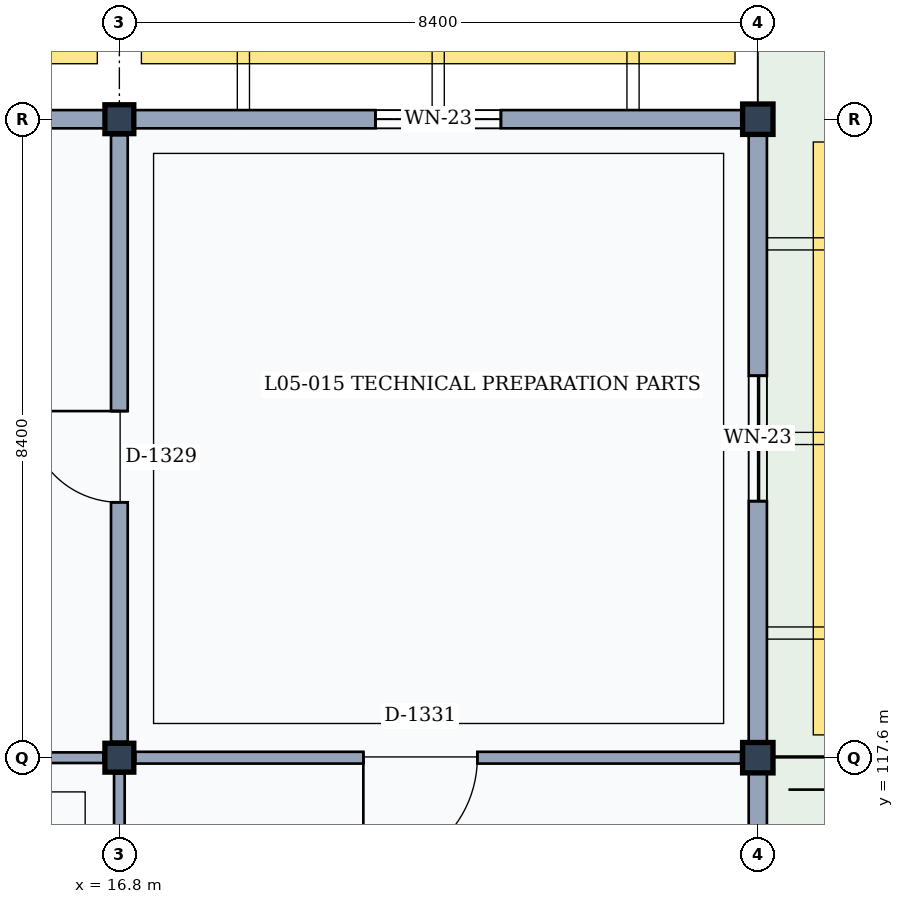
"""IFC4 building model, lengths in metres.
Left out: names, types, materials, properties, quantities, classifications, styles, units other than length and angle.
Written with IfcOpenShell. Run it as: python <this file> out.ifc"""

import sys

from ifc_helpers import new_model, si_unit, direction, frame, frame_2d, origin, origin_2d, place, context, subcontext, project, spatial, rectangle, extrude, element, fill, save


model = new_model("IFC4")
c1 = context("Model", 3, precision=1e-05, world=origin(), true_north=direction((0.0, 1.0)))
c2 = subcontext(c1, "Body", "Model", "MODEL_VIEW")
j1 = project(units=[si_unit("LENGTHUNIT", "METRE"), si_unit("PLANEANGLEUNIT", "RADIAN")], contexts=[c1])
p1 = place(None, origin())
s1 = spatial("IfcSite", under=j1, at=p1, CompositionType="ELEMENT")
p2 = place(p1, origin())
s2 = spatial("IfcBuilding", under=s1, at=p2, CompositionType="ELEMENT")
p3 = place(p2, frame((0.0, 0.0, 22.2)))
s3 = spatial("IfcBuildingStorey", under=s2, at=p3, CompositionType="ELEMENT", Elevation=22.2)
for number, where, z_axis, x_axis in (
    (1, (16.8, 117.6, 0.0), (0.0, 0.0, 1.0), (1.0, 0.0, 0.0)),
    (2, (16.8, 126.0, 0.0), (0.0, 0.0, 1.0), (1.0, 0.0, 0.0)),
):
    element("IfcColumn", number, at=place(p3, frame(where, z_axis=z_axis, x_axis=x_axis)), inside=s3, PredefinedType="COLUMN", context=c2, shape_type="SweptSolid", body=[
        extrude(rectangle(XDim=0.38, YDim=0.38, at=origin_2d()), origin(), (0.0, 0.0, 1.0), 4.2),
    ])
for number, where, z_axis, x_axis in (
    (3, (25.2, 117.6, 0.0), (0.0, 0.0, 1.0), (1.0, 0.0, 0.0)),
    (4, (25.2, 126.0, 0.0), (0.0, 0.0, 1.0), (1.0, 0.0, 0.0)),
):
    element("IfcColumn", number, at=place(p3, frame(where, z_axis=z_axis, x_axis=x_axis)), inside=s3, PredefinedType="COLUMN", context=c2, shape_type="SweptSolid", body=[
        extrude(rectangle(XDim=0.4, YDim=0.4, at=origin_2d()), origin(), (0.0, 0.0, 1.0), 4.2),
    ])
p4 = place(p3, frame((8.6, 126.0, 0.0), z_axis=(0.0, 0.0, 1.0), x_axis=(1.0, 0.0, 0.0)))
e5 = element("IfcWall", 5, at=p4, inside=s3, PredefinedType="SOLIDWALL", context=c2, shape_type="SweptSolid", body=[
    extrude(rectangle(XDim=8.01, YDim=0.24, at=frame_2d((4.005, 0.0))), origin(), (0.0, 0.0, 1.0), 3.36),
])
p5 = place(p4, frame((3.055, 0.0, 0.9)))
e6 = element("IfcOpeningElement", 6, at=p5, cuts=e5, PredefinedType="OPENING", context=c2, shape_type="SweptSolid", body=[
    extrude(rectangle(XDim=1.9, YDim=2.05, at=frame_2d((0.95, 1.025))), frame((0.0, 0.13, 0.0), z_axis=(0.0, -1.0, 0.0), x_axis=(1.0, 0.0, 0.0)), (0.0, 0.0, 1.0), 0.26),
])
p6 = place(p3, frame((25.2, 117.4, 0.0), z_axis=(0.0, 0.0, 1.0), x_axis=(0.0, -1.0, 0.0)))
e7 = element("IfcWall", 7, at=p6, inside=s3, PredefinedType="SOLIDWALL", context=c2, shape_type="SweptSolid", body=[
    extrude(rectangle(XDim=8.0, YDim=0.24, at=frame_2d((4.0, 0.0))), origin(), (0.0, 0.0, 1.0), 3.36),
])
p7 = place(p6, frame((3.45, 0.0, 0.0)))
e8 = element("IfcOpeningElement", 8, at=p7, cuts=e7, PredefinedType="OPENING", context=c2, shape_type="SweptSolid", body=[
    extrude(rectangle(XDim=1.1, YDim=2.2, at=frame_2d((0.55, 1.1))), frame((0.0, 0.13, 0.0), z_axis=(0.0, -1.0, 0.0), x_axis=(1.0, 0.0, 0.0)), (0.0, 0.0, 1.0), 0.26),
])
p8 = place(p3, frame((16.99, 126.0, 0.0), z_axis=(0.0, 0.0, 1.0), x_axis=(1.0, 0.0, 0.0)))
e9 = element("IfcWall", 9, at=p8, inside=s3, PredefinedType="SOLIDWALL", context=c2, shape_type="SweptSolid", body=[
    extrude(rectangle(XDim=8.01, YDim=0.24, at=frame_2d((4.005, 0.0))), origin(), (0.0, 0.0, 1.0), 3.36),
])
p9 = place(p8, frame((3.18, 0.0, 0.9)))
e10 = element("IfcOpeningElement", 10, at=p9, cuts=e9, PredefinedType="OPENING", context=c2, shape_type="SweptSolid", body=[
    extrude(rectangle(XDim=1.65, YDim=1.9, at=frame_2d((0.825, 0.95))), frame((0.0, 0.13, 0.0), z_axis=(0.0, -1.0, 0.0), x_axis=(1.0, 0.0, 0.0)), (0.0, 0.0, 1.0), 0.26),
])
p10 = place(p3, frame((25.2, 125.8, 0.0), z_axis=(0.0, 0.0, 1.0), x_axis=(0.0, -1.0, 0.0)))
e11 = element("IfcWall", 11, at=p10, inside=s3, PredefinedType="SOLIDWALL", context=c2, shape_type="SweptSolid", body=[
    extrude(rectangle(XDim=8.0, YDim=0.24, at=frame_2d((4.0, 0.0))), origin(), (0.0, 0.0, 1.0), 3.36),
])
p11 = place(p10, frame((3.175, 0.0, 0.9)))
e12 = element("IfcOpeningElement", 12, at=p11, cuts=e11, PredefinedType="OPENING", context=c2, shape_type="SweptSolid", body=[
    extrude(rectangle(XDim=1.65, YDim=1.9, at=frame_2d((0.825, 0.95))), frame((0.0, 0.13, 0.0), z_axis=(0.0, -1.0, 0.0), x_axis=(1.0, 0.0, 0.0)), (0.0, 0.0, 1.0), 0.26),
])
p12 = place(p3, frame((16.8, 109.41, 0.0), z_axis=(0.0, 0.0, 1.0), x_axis=(0.0, 1.0, 0.0)))
e13 = element("IfcWall", 13, at=p12, inside=s3, PredefinedType="PARTITIONING", context=c2, shape_type="SweptSolid", body=[
    extrude(rectangle(XDim=7.98, YDim=0.14, at=frame_2d((3.99, 0.0))), origin(), (0.0, 0.0, 1.0), 3.32),
])
p13 = place(p12, frame((3.275, 0.0, 0.0)))
e14 = element("IfcOpeningElement", 14, at=p13, cuts=e13, PredefinedType="OPENING", context=c2, shape_type="SweptSolid", body=[
    extrude(rectangle(XDim=0.95, YDim=2.15, at=frame_2d((0.475, 1.075))), frame((0.0, 0.08, 0.0), z_axis=(0.0, -1.0, 0.0), x_axis=(1.0, 0.0, 0.0)), (0.0, 0.0, 1.0), 0.16),
])
p14 = place(p3, frame((8.62, 117.6, 0.0), z_axis=(0.0, 0.0, 1.0), x_axis=(1.0, 0.0, 0.0)))
e15 = element("IfcWall", 15, at=p14, inside=s3, PredefinedType="PARTITIONING", context=c2, shape_type="SweptSolid", body=[
    extrude(rectangle(XDim=7.97, YDim=0.14, at=frame_2d((3.985, 0.0))), origin(), (0.0, 0.0, 1.0), 3.32),
])
p15 = place(p3, frame((16.8, 117.81, 0.0), z_axis=(0.0, 0.0, 1.0), x_axis=(0.0, 1.0, 0.0)))
e16 = element("IfcWall", 16, at=p15, inside=s3, PredefinedType="PARTITIONING", context=c2, shape_type="SweptSolid", body=[
    extrude(rectangle(XDim=7.98, YDim=0.22, at=frame_2d((3.99, 0.0))), origin(), (0.0, 0.0, 1.0), 3.32),
])
p16 = place(p15, frame((3.15, 0.0, 0.0)))
e17 = element("IfcOpeningElement", 17, at=p16, cuts=e16, PredefinedType="OPENING", context=c2, shape_type="SweptSolid", body=[
    extrude(rectangle(XDim=1.2, YDim=2.2, at=frame_2d((0.6, 1.1))), frame((0.0, 0.12, 0.0), z_axis=(0.0, -1.0, 0.0), x_axis=(1.0, 0.0, 0.0)), (0.0, 0.0, 1.0), 0.24),
])
p17 = place(p3, frame((17.01, 117.6, 0.0), z_axis=(0.0, 0.0, 1.0), x_axis=(1.0, 0.0, 0.0)))
e18 = element("IfcWall", 18, at=p17, inside=s3, PredefinedType="PARTITIONING", context=c2, shape_type="SweptSolid", body=[
    extrude(rectangle(XDim=7.97, YDim=0.155, at=frame_2d((3.985, 0.0))), origin(), (0.0, 0.0, 1.0), 3.32),
])
p18 = place(p17, frame((3.0, 0.0, 0.0)))
e19 = element("IfcOpeningElement", 19, at=p18, cuts=e18, PredefinedType="OPENING", context=c2, shape_type="SweptSolid", body=[
    extrude(rectangle(XDim=1.5, YDim=2.3, at=frame_2d((0.75, 1.15))), frame((0.0, 0.087, 0.0), z_axis=(0.0, -1.0, 0.0), x_axis=(1.0, 0.0, 0.0)), (0.0, 0.0, 1.0), 0.175),
])
p19 = place(p9, origin())
e20 = element("IfcWindow", 20, at=p19, inside=s3, PartitioningType="SINGLE_PANEL", PredefinedType="WINDOW", context=c2, shape_type="SweptSolid", body=[
    extrude(rectangle(XDim=1.65, YDim=1.9, at=frame_2d((0.825, 0.95))), frame((0.0, 0.03, 0.0), z_axis=(0.0, -1.0, 0.0), x_axis=(1.0, 0.0, 0.0)), (0.0, 0.0, 1.0), 0.06),
])
fill(e10, e20)
p20 = place(p11, origin())
e21 = element("IfcWindow", 21, at=p20, inside=s3, PartitioningType="SINGLE_PANEL", PredefinedType="WINDOW", context=c2, shape_type="SweptSolid", body=[
    extrude(rectangle(XDim=1.65, YDim=1.9, at=frame_2d((0.825, 0.95))), frame((0.0, 0.03, 0.0), z_axis=(0.0, -1.0, 0.0), x_axis=(1.0, 0.0, 0.0)), (0.0, 0.0, 1.0), 0.06),
])
fill(e12, e21)
p21 = place(p16, origin())
e22 = element("IfcDoor", 22, at=p21, inside=s3, OperationType="SINGLE_SWING_RIGHT", PredefinedType="DOOR", context=c2, shape_type="SweptSolid", body=[
    extrude(rectangle(XDim=1.2, YDim=2.2, at=frame_2d((0.6, 1.1))), frame((0.0, 0.025, 0.0), z_axis=(0.0, -1.0, 0.0), x_axis=(1.0, 0.0, 0.0)), (0.0, 0.0, 1.0), 0.05),
])
fill(e17, e22)
p22 = place(p18, frame((1.5, 0.0, 0.0), z_axis=(0.0, 0.0, 1.0), x_axis=(-1.0, 0.0, 0.0)))
e23 = element("IfcDoor", 23, at=p22, inside=s3, OperationType="SINGLE_SWING_RIGHT", PredefinedType="DOOR", context=c2, shape_type="SweptSolid", body=[
    extrude(rectangle(XDim=1.5, YDim=2.3, at=frame_2d((0.75, 1.15))), frame((0.0, 0.025, 0.0), z_axis=(0.0, -1.0, 0.0), x_axis=(1.0, 0.0, 0.0)), (0.0, 0.0, 1.0), 0.05),
])
fill(e19, e23)
save(model, sys.argv[1])
